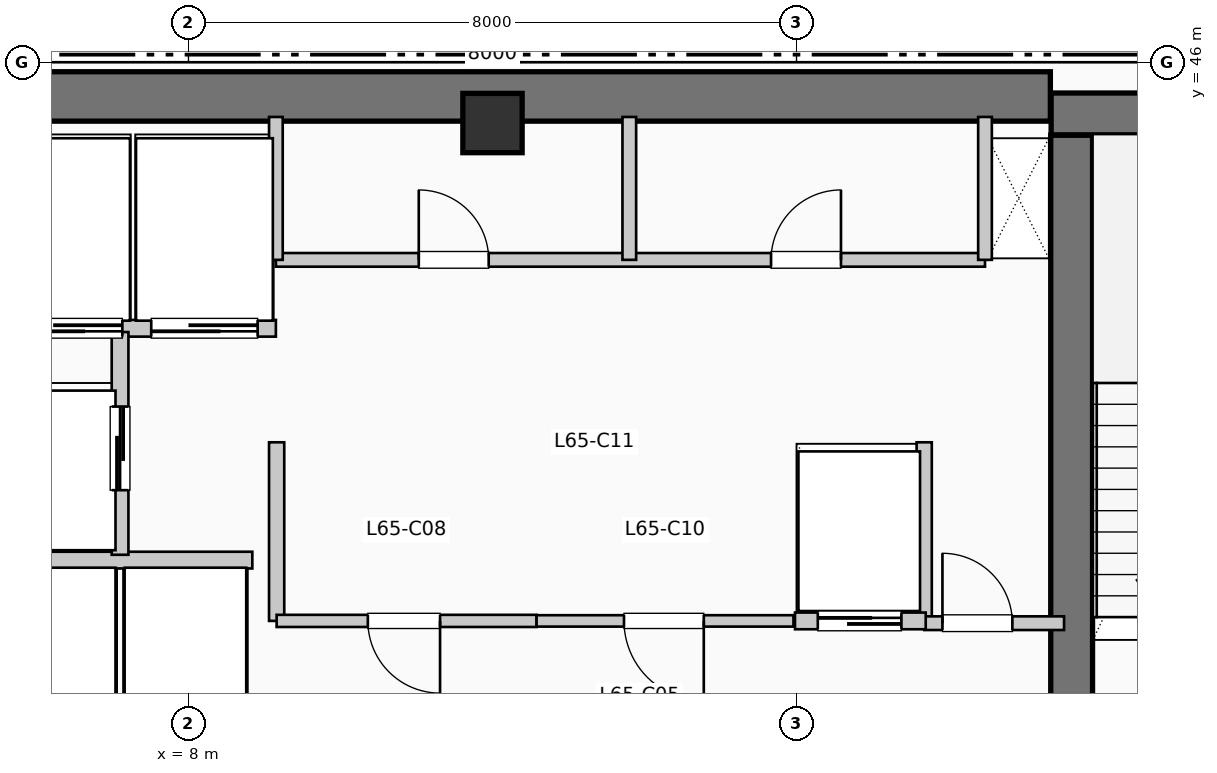
"""IFC4 building model, lengths in metres.
Left out: names, types, materials, properties, quantities, classifications, styles, units other than length and angle.
Written with IfcOpenShell. Run it as: python <this file> out.ifc"""

import sys

from ifc_helpers import new_model, si_unit, direction, frame, frame_2d, origin, origin_2d, place, context, subcontext, project, spatial, rectangle, extrude, element, fill, save


model = new_model("IFC4")
c1 = context("Model", 3, precision=1e-05, world=origin(), true_north=direction((0.0, 1.0)))
c2 = subcontext(c1, "Body", "Model", "MODEL_VIEW")
j1 = project(units=[si_unit("LENGTHUNIT", "METRE"), si_unit("PLANEANGLEUNIT", "RADIAN")], contexts=[c1])
p1 = place(None, origin())
s1 = spatial("IfcSite", under=j1, at=p1, CompositionType="ELEMENT")
p2 = place(p1, origin())
s2 = spatial("IfcBuilding", under=s1, at=p2, CompositionType="ELEMENT")
p3 = place(p2, frame((0.0, 0.0, 268.29)))
s3 = spatial("IfcBuildingStorey", under=s2, at=p3, CompositionType="ELEMENT", Elevation=268.29)
p4 = place(p3, frame((5.36, 45.55, 0.0), z_axis=(0.0, 0.0, 1.0), x_axis=(1.0, 0.0, 0.0)))
e1 = element("IfcWall", 1, at=p4, inside=s3, PredefinedType="SHEAR", context=c2, shape_type="SweptSolid", body=[
    extrude(rectangle(XDim=13.98, YDim=0.65, at=frame_2d((6.99, 0.0))), origin(), (0.0, 0.0, 1.0), 3.96),
])
p5 = place(p3, frame((19.62, 37.15, 0.0), z_axis=(0.0, 0.0, 1.0), x_axis=(0.0, 1.0, 0.0)))
e2 = element("IfcWall", 2, at=p5, inside=s3, PredefinedType="SHEAR", context=c2, shape_type="SweptSolid", body=[
    extrude(rectangle(XDim=7.89, YDim=0.55, at=frame_2d((3.945, 0.0))), origin(), (0.0, 0.0, 1.0), 3.96),
])
p6 = place(p3, frame((19.35, 45.32, 0.0), z_axis=(0.0, 0.0, 1.0), x_axis=(1.0, 0.0, 0.0)))
e3 = element("IfcWall", 3, at=p6, inside=s3, PredefinedType="SHEAR", context=c2, shape_type="SweptSolid", body=[
    extrude(rectangle(XDim=3.69, YDim=0.55, at=frame_2d((1.845, 0.0))), origin(), (0.0, 0.0, 1.0), 3.96),
])
p7 = place(p6, frame((1.15, 0.0, 1.05)))
e4 = element("IfcOpeningElement", 4, at=p7, cuts=e3, PredefinedType="OPENING", context=c2, shape_type="SweptSolid", body=[
    extrude(rectangle(XDim=1.4, YDim=1.8, at=frame_2d((0.7, 0.9))), frame((0.0, 0.285, 0.0), z_axis=(0.0, -1.0, 0.0), x_axis=(1.0, 0.0, 0.0)), (0.0, 0.0, 1.0), 0.57),
])
p8 = place(p3, frame((12.0, 45.2, 0.0), z_axis=(0.0, 0.0, 1.0), x_axis=(1.0, 0.0, 0.0)))
e5 = element("IfcColumn", 5, at=p8, inside=s3, PredefinedType="COLUMN", context=c2, shape_type="SweptSolid", body=[
    extrude(rectangle(XDim=0.78, YDim=0.78, at=origin_2d()), origin(), (0.0, 0.0, 1.0), 3.96),
])
p9 = place(p3, frame((5.38, 39.45, 0.0), z_axis=(0.0, 0.0, 1.0), x_axis=(1.0, 0.0, 0.0)))
e6 = element("IfcWall", 6, at=p9, inside=s3, PredefinedType="PARTITIONING", context=c2, shape_type="SweptSolid", body=[
    extrude(rectangle(XDim=3.46, YDim=0.22, at=frame_2d((1.73, 0.0))), origin(), (0.0, 0.0, 1.0), 3.74),
])
p10 = place(p3, frame((5.38, 42.5, 0.0), z_axis=(0.0, 0.0, 1.0), x_axis=(1.0, 0.0, 0.0)))
e7 = element("IfcWall", 7, at=p10, inside=s3, PredefinedType="PARTITIONING", context=c2, shape_type="SweptSolid", body=[
    extrude(rectangle(XDim=3.77, YDim=0.22, at=frame_2d((1.885, 0.0))), origin(), (0.0, 0.0, 1.0), 3.74),
])
p11 = place(p10, frame((1.75, 0.0, 0.0), z_axis=(0.0, 0.0, 1.0), x_axis=(-1.0, 0.0, 0.0)))
e8 = element("IfcOpeningElement", 8, at=p11, cuts=e7, PredefinedType="OPENING", context=c2, shape_type="SweptSolid", body=[
    extrude(rectangle(XDim=1.4, YDim=2.2, at=frame_2d((0.7, 1.1))), frame((0.0, 0.12, 0.0), z_axis=(0.0, -1.0, 0.0), x_axis=(1.0, 0.0, 0.0)), (0.0, 0.0, 1.0), 0.24),
])
p12 = place(p10, frame((3.53, 0.0, 0.0), z_axis=(0.0, 0.0, 1.0), x_axis=(-1.0, 0.0, 0.0)))
e9 = element("IfcOpeningElement", 9, at=p12, cuts=e7, PredefinedType="OPENING", context=c2, shape_type="SweptSolid", body=[
    extrude(rectangle(XDim=1.4, YDim=2.2, at=frame_2d((0.7, 1.1))), frame((0.0, 0.12, 0.0), z_axis=(0.0, -1.0, 0.0), x_axis=(1.0, 0.0, 0.0)), (0.0, 0.0, 1.0), 0.24),
])
p13 = place(p3, frame((7.1, 39.52, 0.0), z_axis=(0.0, 0.0, 1.0), x_axis=(0.0, 1.0, 0.0)))
e10 = element("IfcWall", 10, at=p13, inside=s3, PredefinedType="PARTITIONING", context=c2, shape_type="SweptSolid", body=[
    extrude(rectangle(XDim=2.93, YDim=0.22, at=frame_2d((1.465, 0.0))), origin(), (0.0, 0.0, 1.0), 3.74),
])
p14 = place(p13, frame((0.85, 0.0, 0.0)))
e11 = element("IfcOpeningElement", 11, at=p14, cuts=e10, PredefinedType="OPENING", context=c2, shape_type="SweptSolid", body=[
    extrude(rectangle(XDim=1.1, YDim=2.2, at=frame_2d((0.55, 1.1))), frame((0.0, 0.12, 0.0), z_axis=(0.0, -1.0, 0.0), x_axis=(1.0, 0.0, 0.0)), (0.0, 0.0, 1.0), 0.24),
])
for number, where, z_axis, x_axis in (
    (12, (9.16, 38.65, 0.0), (0.0, 0.0, 1.0), (0.0, 1.0, 0.0)),
    (13, (17.68, 38.65, 0.0), (0.0, 0.0, 1.0), (0.0, 1.0, 0.0)),
):
    element("IfcWall", number, at=place(p3, frame(where, z_axis=z_axis, x_axis=x_axis)), inside=s3, PredefinedType="PARTITIONING", context=c2, shape_type="SweptSolid", body=[
        extrude(rectangle(XDim=2.35, YDim=0.2, at=frame_2d((1.175, 0.0))), origin(), (0.0, 0.0, 1.0), 3.74),
    ])
p15 = place(p3, frame((17.68, 38.62, 0.0), z_axis=(0.0, 0.0, 1.0), x_axis=(1.0, 0.0, 0.0)))
e14 = element("IfcWall", 14, at=p15, inside=s3, PredefinedType="PARTITIONING", context=c2, shape_type="SweptSolid", body=[
    extrude(rectangle(XDim=1.84, YDim=0.18, at=frame_2d((0.92, 0.0))), origin(), (0.0, 0.0, 1.0), 3.74),
])
p16 = place(p15, frame((0.24, 0.0, 0.0)))
e15 = element("IfcOpeningElement", 15, at=p16, cuts=e14, PredefinedType="OPENING", context=c2, shape_type="SweptSolid", body=[
    extrude(rectangle(XDim=0.92, YDim=2.1, at=frame_2d((0.46, 1.05))), frame((0.0, 0.1, 0.0), z_axis=(0.0, -1.0, 0.0), x_axis=(1.0, 0.0, 0.0)), (0.0, 0.0, 1.0), 0.2),
])
p17 = place(p3, frame((9.16, 38.65, 0.0), z_axis=(0.0, 0.0, 1.0), x_axis=(1.0, 0.0, 0.0)))
e16 = element("IfcWall", 16, at=p17, inside=s3, PredefinedType="PARTITIONING", context=c2, shape_type="SweptSolid", body=[
    extrude(rectangle(XDim=3.42, YDim=0.16, at=frame_2d((1.71, 0.0))), origin(), (0.0, 0.0, 1.0), 3.74),
])
p18 = place(p17, frame((2.15, 0.0, 0.0), z_axis=(0.0, 0.0, 1.0), x_axis=(-1.0, 0.0, 0.0)))
e17 = element("IfcOpeningElement", 17, at=p18, cuts=e16, PredefinedType="OPENING", context=c2, shape_type="SweptSolid", body=[
    extrude(rectangle(XDim=0.95, YDim=2.15, at=frame_2d((0.475, 1.075))), frame((0.0, 0.09, 0.0), z_axis=(0.0, -1.0, 0.0), x_axis=(1.0, 0.0, 0.0)), (0.0, 0.0, 1.0), 0.18),
])
p19 = place(p3, frame((12.58, 38.65, 0.0), z_axis=(0.0, 0.0, 1.0), x_axis=(1.0, 0.0, 0.0)))
e18 = element("IfcWall", 18, at=p19, inside=s3, PredefinedType="PARTITIONING", context=c2, shape_type="SweptSolid", body=[
    extrude(rectangle(XDim=3.38, YDim=0.15, at=frame_2d((1.69, 0.0))), origin(), (0.0, 0.0, 1.0), 3.74),
])
p20 = place(p19, frame((2.2, 0.0, 0.0), z_axis=(0.0, 0.0, 1.0), x_axis=(-1.0, 0.0, 0.0)))
e19 = element("IfcOpeningElement", 19, at=p20, cuts=e18, PredefinedType="OPENING", context=c2, shape_type="SweptSolid", body=[
    extrude(rectangle(XDim=1.05, YDim=2.15, at=frame_2d((0.525, 1.075))), frame((0.0, 0.085, 0.0), z_axis=(0.0, -1.0, 0.0), x_axis=(1.0, 0.0, 0.0)), (0.0, 0.0, 1.0), 0.17),
])
p21 = place(p3, frame((15.98, 38.65, 0.0), z_axis=(0.0, 0.0, 1.0), x_axis=(1.0, 0.0, 0.0)))
e20 = element("IfcWall", 20, at=p21, inside=s3, PredefinedType="PARTITIONING", context=c2, shape_type="SweptSolid", body=[
    extrude(rectangle(XDim=1.72, YDim=0.22, at=frame_2d((0.86, 0.0))), origin(), (0.0, 0.0, 1.0), 3.74),
])
p22 = place(p21, frame((0.3, 0.0, 0.0)))
e21 = element("IfcOpeningElement", 21, at=p22, cuts=e20, PredefinedType="OPENING", context=c2, shape_type="SweptSolid", body=[
    extrude(rectangle(XDim=1.1, YDim=2.2, at=frame_2d((0.55, 1.1))), frame((0.0, 0.12, 0.0), z_axis=(0.0, -1.0, 0.0), x_axis=(1.0, 0.0, 0.0)), (0.0, 0.0, 1.0), 0.24),
])
p23 = place(p3, frame((9.15, 43.4, 0.0), z_axis=(0.0, 0.0, 1.0), x_axis=(1.0, 0.0, 0.0)))
e22 = element("IfcWall", 22, at=p23, inside=s3, PredefinedType="PLUMBINGWALL", context=c2, shape_type="SweptSolid", body=[
    extrude(rectangle(XDim=9.33, YDim=0.18, at=frame_2d((4.665, 0.0))), origin(), (0.0, 0.0, 1.0), 3.74),
])
p24 = place(p23, frame((1.88, 0.0, 0.0)))
e23 = element("IfcOpeningElement", 23, at=p24, cuts=e22, PredefinedType="OPENING", context=c2, shape_type="SweptSolid", body=[
    extrude(rectangle(XDim=0.92, YDim=2.1, at=frame_2d((0.46, 1.05))), frame((0.0, 0.1, 0.0), z_axis=(0.0, -1.0, 0.0), x_axis=(1.0, 0.0, 0.0)), (0.0, 0.0, 1.0), 0.2),
])
p25 = place(p23, frame((6.515, 0.0, 0.0)))
e24 = element("IfcOpeningElement", 24, at=p25, cuts=e22, PredefinedType="OPENING", context=c2, shape_type="SweptSolid", body=[
    extrude(rectangle(XDim=0.92, YDim=2.1, at=frame_2d((0.46, 1.05))), frame((0.0, 0.1, 0.0), z_axis=(0.0, -1.0, 0.0), x_axis=(1.0, 0.0, 0.0)), (0.0, 0.0, 1.0), 0.2),
])
for number, where, z_axis, x_axis in (
    (25, (9.15, 43.4, 0.0), (0.0, 0.0, 1.0), (0.0, 1.0, 0.0)),
    (26, (18.48, 43.4, 0.0), (0.0, 0.0, 1.0), (0.0, 1.0, 0.0)),
    (27, (13.8, 43.4, 0.0), (0.0, 0.0, 1.0), (0.0, 1.0, 0.0)),
):
    element("IfcWall", number, at=place(p3, frame(where, z_axis=z_axis, x_axis=x_axis)), inside=s3, PredefinedType="PLUMBINGWALL", context=c2, shape_type="SweptSolid", body=[
        extrude(rectangle(XDim=1.88, YDim=0.18, at=frame_2d((0.94, 0.0))), origin(), (0.0, 0.0, 1.0), 3.74),
    ])
p26 = place(p11, origin())
e28 = element("IfcDoor", 28, at=p26, inside=s3, OperationType="SLIDING_TO_LEFT", PredefinedType="DOOR", context=c2, shape_type="SweptSolid", body=[
    extrude(rectangle(XDim=1.4, YDim=2.2, at=frame_2d((0.7, 1.1))), frame((0.0, 0.025, 0.0), z_axis=(0.0, -1.0, 0.0), x_axis=(1.0, 0.0, 0.0)), (0.0, 0.0, 1.0), 0.05),
])
fill(e8, e28)
p27 = place(p12, origin())
e29 = element("IfcDoor", 29, at=p27, inside=s3, OperationType="SLIDING_TO_LEFT", PredefinedType="DOOR", context=c2, shape_type="SweptSolid", body=[
    extrude(rectangle(XDim=1.4, YDim=2.2, at=frame_2d((0.7, 1.1))), frame((0.0, 0.025, 0.0), z_axis=(0.0, -1.0, 0.0), x_axis=(1.0, 0.0, 0.0)), (0.0, 0.0, 1.0), 0.05),
])
fill(e9, e29)
p28 = place(p14, origin())
e30 = element("IfcDoor", 30, at=p28, inside=s3, OperationType="SLIDING_TO_LEFT", PredefinedType="DOOR", context=c2, shape_type="SweptSolid", body=[
    extrude(rectangle(XDim=1.1, YDim=2.2, at=frame_2d((0.55, 1.1))), frame((0.0, 0.025, 0.0), z_axis=(0.0, -1.0, 0.0), x_axis=(1.0, 0.0, 0.0)), (0.0, 0.0, 1.0), 0.05),
])
fill(e11, e30)
p29 = place(p16, origin())
e31 = element("IfcDoor", 31, at=p29, inside=s3, OperationType="SINGLE_SWING_LEFT", PredefinedType="DOOR", context=c2, shape_type="SweptSolid", body=[
    extrude(rectangle(XDim=0.92, YDim=2.1, at=frame_2d((0.46, 1.05))), frame((0.0, 0.025, 0.0), z_axis=(0.0, -1.0, 0.0), x_axis=(1.0, 0.0, 0.0)), (0.0, 0.0, 1.0), 0.05),
])
fill(e15, e31)
p30 = place(p18, origin())
e32 = element("IfcDoor", 32, at=p30, inside=s3, OperationType="SINGLE_SWING_RIGHT", PredefinedType="DOOR", context=c2, shape_type="SweptSolid", body=[
    extrude(rectangle(XDim=0.95, YDim=2.15, at=frame_2d((0.475, 1.075))), frame((0.0, 0.025, 0.0), z_axis=(0.0, -1.0, 0.0), x_axis=(1.0, 0.0, 0.0)), (0.0, 0.0, 1.0), 0.05),
])
fill(e17, e32)
p31 = place(p20, origin())
e33 = element("IfcDoor", 33, at=p31, inside=s3, OperationType="SINGLE_SWING_RIGHT", PredefinedType="DOOR", context=c2, shape_type="SweptSolid", body=[
    extrude(rectangle(XDim=1.05, YDim=2.15, at=frame_2d((0.525, 1.075))), frame((0.0, 0.025, 0.0), z_axis=(0.0, -1.0, 0.0), x_axis=(1.0, 0.0, 0.0)), (0.0, 0.0, 1.0), 0.05),
])
fill(e19, e33)
p32 = place(p22, origin())
e34 = element("IfcDoor", 34, at=p32, inside=s3, OperationType="SLIDING_TO_LEFT", PredefinedType="DOOR", context=c2, shape_type="SweptSolid", body=[
    extrude(rectangle(XDim=1.1, YDim=2.2, at=frame_2d((0.55, 1.1))), frame((0.0, 0.025, 0.0), z_axis=(0.0, -1.0, 0.0), x_axis=(1.0, 0.0, 0.0)), (0.0, 0.0, 1.0), 0.05),
])
fill(e21, e34)
p33 = place(p24, origin())
e35 = element("IfcDoor", 35, at=p33, inside=s3, OperationType="SINGLE_SWING_LEFT", PredefinedType="DOOR", context=c2, shape_type="SweptSolid", body=[
    extrude(rectangle(XDim=0.92, YDim=2.1, at=frame_2d((0.46, 1.05))), frame((0.0, 0.025, 0.0), z_axis=(0.0, -1.0, 0.0), x_axis=(1.0, 0.0, 0.0)), (0.0, 0.0, 1.0), 0.05),
])
fill(e23, e35)
p34 = place(p25, origin())
e36 = element("IfcDoor", 36, at=p34, inside=s3, OperationType="SINGLE_SWING_RIGHT", PredefinedType="DOOR", context=c2, shape_type="SweptSolid", body=[
    extrude(rectangle(XDim=0.92, YDim=2.1, at=frame_2d((0.46, 1.05))), frame((0.0, 0.025, 0.0), z_axis=(0.0, -1.0, 0.0), x_axis=(1.0, 0.0, 0.0)), (0.0, 0.0, 1.0), 0.05),
])
fill(e24, e36)
save(model, sys.argv[1])
